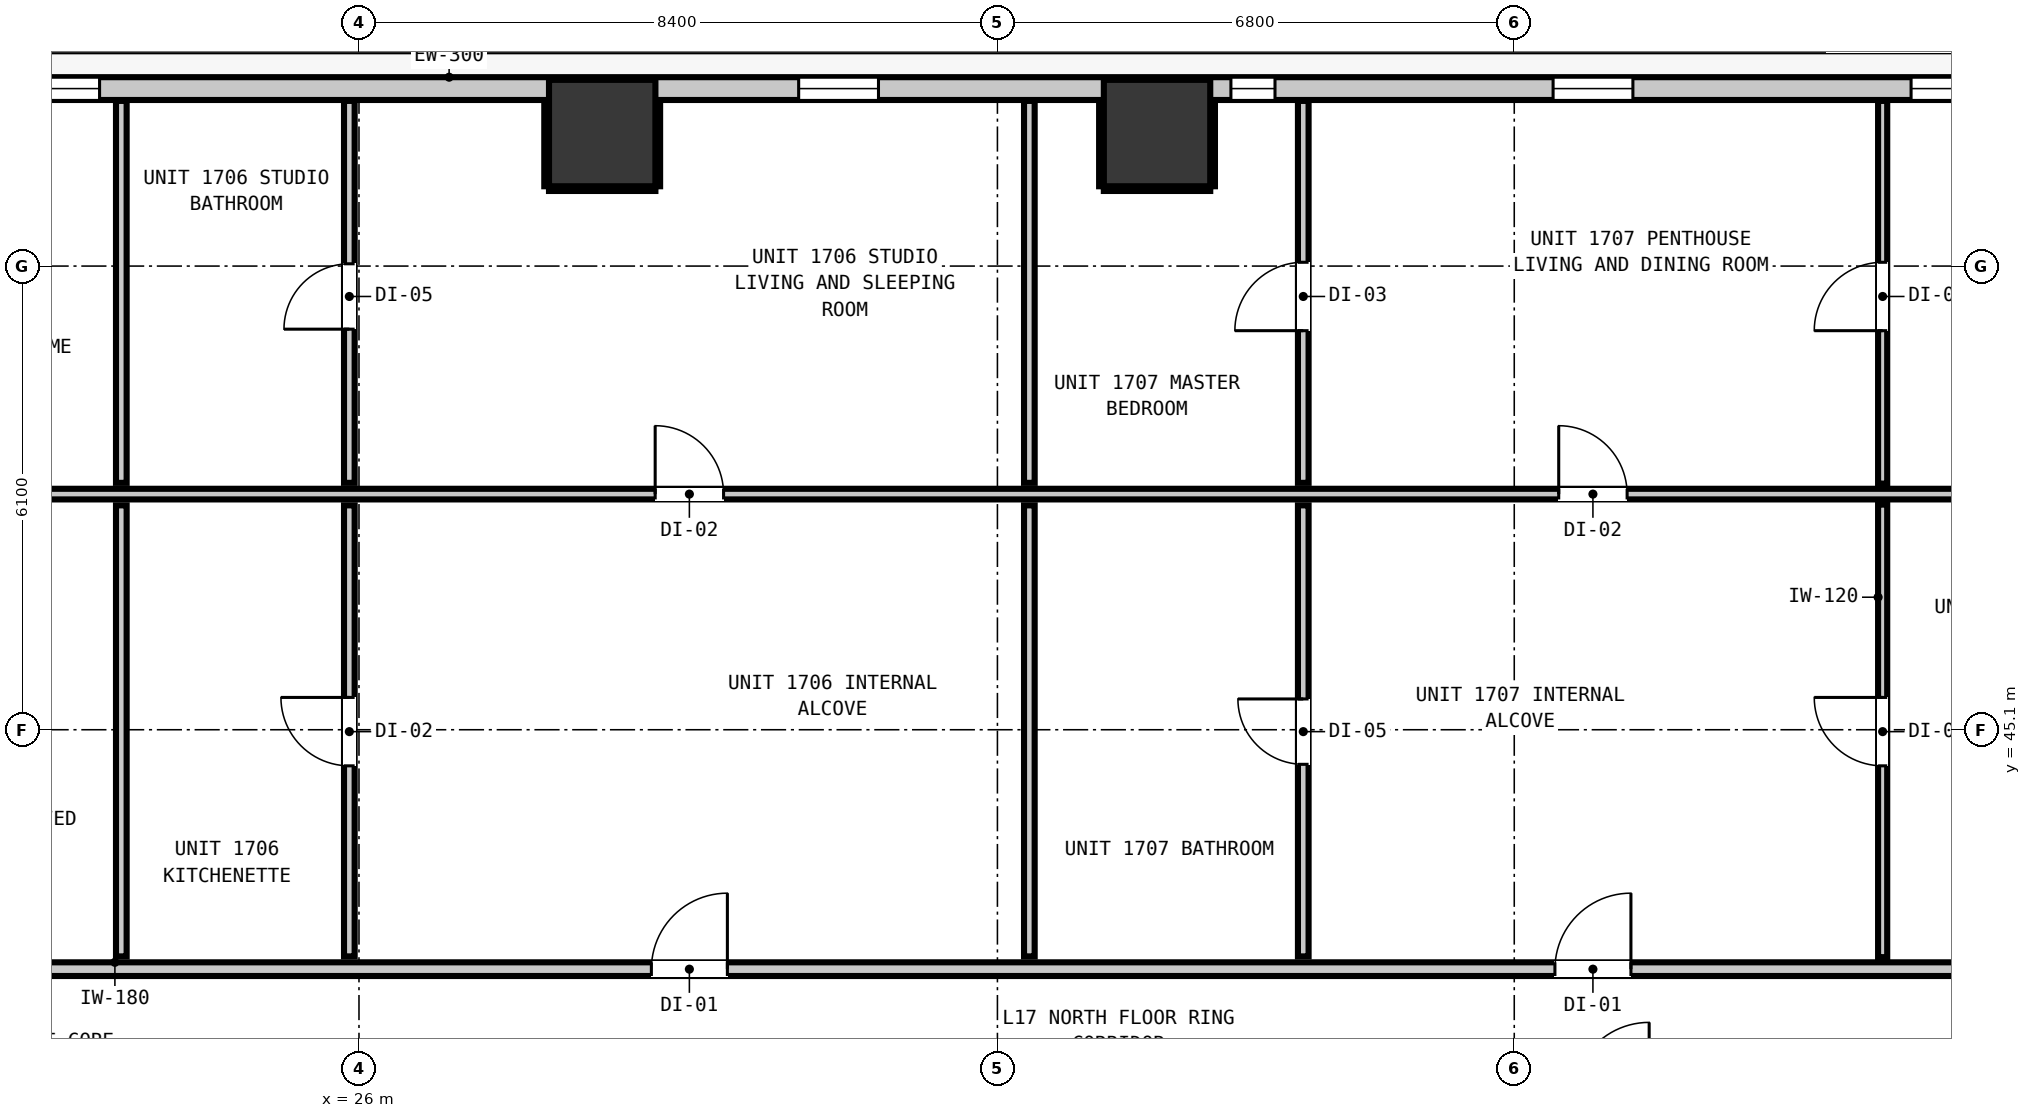
"""IFC4 building model, lengths in metres.
Left out: names, types, materials, properties, quantities, classifications, styles, units other than length and angle.
Written with IfcOpenShell. Run it as: python <this file> out.ifc"""

import sys

from ifc_helpers import new_model, si_unit, direction, frame, frame_2d, origin, origin_2d, place, context, subcontext, project, spatial, rectangle, extrude, element, fill, save


model = new_model("IFC4")
c1 = context("Model", 3, precision=1e-05, world=origin(), true_north=direction((0.0, 1.0)))
c2 = subcontext(c1, "Body", "Model", "MODEL_VIEW")
j1 = project(units=[si_unit("LENGTHUNIT", "METRE"), si_unit("PLANEANGLEUNIT", "RADIAN")], contexts=[c1])
p1 = place(None, origin())
s1 = spatial("IfcSite", under=j1, at=p1, CompositionType="ELEMENT")
p2 = place(p1, origin())
s2 = spatial("IfcBuilding", under=s1, at=p2, CompositionType="ELEMENT")
p3 = place(p2, frame((0.0, 0.0, 61.84)))
s3 = spatial("IfcBuildingStorey", under=s2, at=p3, CompositionType="ELEMENT", Elevation=61.84)
for number, where, z_axis, x_axis in (
    (1, (29.2, 52.95, -0.2), (0.0, 0.0, 1.0), (1.0, 0.0, 0.0)),
    (2, (36.5, 52.95, -0.2), (0.0, 0.0, 1.0), (1.0, 0.0, 0.0)),
):
    element("IfcColumn", number, at=place(p3, frame(where, z_axis=z_axis, x_axis=x_axis)), inside=s3, PredefinedType="COLUMN", context=c2, shape_type="SweptSolid", body=[
        extrude(rectangle(XDim=1.4, YDim=1.4, at=origin_2d()), origin(), (0.0, 0.0, 1.0), 3.52),
    ])
p4 = place(p3, frame((10.365, 53.535, 0.0), z_axis=(0.0, 0.0, 1.0), x_axis=(1.0, 0.0, 0.0)))
e3 = element("IfcWall", 3, at=p4, inside=s3, PredefinedType="STANDARD", context=c2, shape_type="SweptSolid", body=[
    extrude(rectangle(XDim=37.47, YDim=0.3, at=frame_2d((18.735, 0.0))), origin(), (0.0, 0.0, 1.0), 3.06),
])
p5 = place(p4, frame((4.403, 0.0, 0.0)))
e4 = element("IfcOpeningElement", 4, at=p5, cuts=e3, PredefinedType="OPENING", context=c2, shape_type="SweptSolid", body=[
    extrude(rectangle(XDim=1.0, YDim=2.15, at=frame_2d((0.5, 1.075))), frame((0.0, 0.16, 0.0), z_axis=(0.0, -1.0, 0.0), x_axis=(1.0, 0.0, 0.0)), (0.0, 0.0, 1.0), 0.32),
])
p6 = place(p4, frame((6.472, 0.0, 0.85)))
e5 = element("IfcOpeningElement", 5, at=p6, cuts=e3, PredefinedType="OPENING", context=c2, shape_type="SweptSolid", body=[
    extrude(rectangle(XDim=1.05, YDim=1.65, at=frame_2d((0.525, 0.825))), frame((0.0, 0.16, 0.0), z_axis=(0.0, -1.0, 0.0), x_axis=(1.0, 0.0, 0.0)), (0.0, 0.0, 1.0), 0.32),
])
p7 = place(p4, frame((0.324, 0.0, 0.85)))
e6 = element("IfcOpeningElement", 6, at=p7, cuts=e3, PredefinedType="OPENING", context=c2, shape_type="SweptSolid", body=[
    extrude(rectangle(XDim=0.58, YDim=1.5, at=frame_2d((0.29, 0.75))), frame((0.0, 0.16, 0.0), z_axis=(0.0, -1.0, 0.0), x_axis=(1.0, 0.0, 0.0)), (0.0, 0.0, 1.0), 0.32),
])
p8 = place(p4, frame((11.322, 0.0, 0.85)))
e7 = element("IfcOpeningElement", 7, at=p8, cuts=e3, PredefinedType="OPENING", context=c2, shape_type="SweptSolid", body=[
    extrude(rectangle(XDim=0.9, YDim=1.5, at=frame_2d((0.45, 0.75))), frame((0.0, 0.16, 0.0), z_axis=(0.0, -1.0, 0.0), x_axis=(1.0, 0.0, 0.0)), (0.0, 0.0, 1.0), 0.32),
])
p9 = place(p4, frame((21.42, 0.0, 0.85)))
e8 = element("IfcOpeningElement", 8, at=p9, cuts=e3, PredefinedType="OPENING", context=c2, shape_type="SweptSolid", body=[
    extrude(rectangle(XDim=1.05, YDim=1.65, at=frame_2d((0.525, 0.825))), frame((0.0, 0.16, 0.0), z_axis=(0.0, -1.0, 0.0), x_axis=(1.0, 0.0, 0.0)), (0.0, 0.0, 1.0), 0.32),
])
p10 = place(p4, frame((31.346, 0.0, 0.85)))
e9 = element("IfcOpeningElement", 9, at=p10, cuts=e3, PredefinedType="OPENING", context=c2, shape_type="SweptSolid", body=[
    extrude(rectangle(XDim=1.05, YDim=1.65, at=frame_2d((0.525, 0.825))), frame((0.0, 0.16, 0.0), z_axis=(0.0, -1.0, 0.0), x_axis=(1.0, 0.0, 0.0)), (0.0, 0.0, 1.0), 0.32),
])
p11 = place(p4, frame((27.107, 0.0, 0.85)))
e10 = element("IfcOpeningElement", 10, at=p11, cuts=e3, PredefinedType="OPENING", context=c2, shape_type="SweptSolid", body=[
    extrude(rectangle(XDim=0.58, YDim=1.5, at=frame_2d((0.29, 0.75))), frame((0.0, 0.16, 0.0), z_axis=(0.0, -1.0, 0.0), x_axis=(1.0, 0.0, 0.0)), (0.0, 0.0, 1.0), 0.32),
])
p12 = place(p4, frame((36.056, 0.0, 0.85)))
e11 = element("IfcOpeningElement", 11, at=p12, cuts=e3, PredefinedType="OPENING", context=c2, shape_type="SweptSolid", body=[
    extrude(rectangle(XDim=1.05, YDim=1.65, at=frame_2d((0.525, 0.825))), frame((0.0, 0.16, 0.0), z_axis=(0.0, -1.0, 0.0), x_axis=(1.0, 0.0, 0.0)), (0.0, 0.0, 1.0), 0.32),
])
p13 = place(p3, frame((8.027, 41.95, 0.0), z_axis=(0.0, 0.0, 1.0), x_axis=(1.0, 0.0, 0.0)))
e12 = element("IfcWall", 12, at=p13, inside=s3, PredefinedType="PARTITIONING", context=c2, shape_type="SweptSolid", body=[
    extrude(rectangle(XDim=42.146, YDim=0.18, at=frame_2d((21.073, 0.0))), origin(), (0.0, 0.0, 1.0), 3.06),
])
p14 = place(p13, frame((6.703, 0.0, 0.0)))
e13 = element("IfcOpeningElement", 13, at=p14, cuts=e12, PredefinedType="OPENING", context=c2, shape_type="SweptSolid", body=[
    extrude(rectangle(XDim=1.0, YDim=2.15, at=frame_2d((0.5, 1.075))), frame((0.0, 0.1, 0.0), z_axis=(0.0, -1.0, 0.0), x_axis=(1.0, 0.0, 0.0)), (0.0, 0.0, 1.0), 0.2),
])
p15 = place(p13, frame((21.82, 0.0, 0.0)))
e14 = element("IfcOpeningElement", 14, at=p15, cuts=e12, PredefinedType="OPENING", context=c2, shape_type="SweptSolid", body=[
    extrude(rectangle(XDim=1.0, YDim=2.15, at=frame_2d((0.5, 1.075))), frame((0.0, 0.1, 0.0), z_axis=(0.0, -1.0, 0.0), x_axis=(1.0, 0.0, 0.0)), (0.0, 0.0, 1.0), 0.2),
])
p16 = place(p13, frame((33.708, 0.0, 0.0)))
e15 = element("IfcOpeningElement", 15, at=p16, cuts=e12, PredefinedType="OPENING", context=c2, shape_type="SweptSolid", body=[
    extrude(rectangle(XDim=1.0, YDim=2.15, at=frame_2d((0.5, 1.075))), frame((0.0, 0.1, 0.0), z_axis=(0.0, -1.0, 0.0), x_axis=(1.0, 0.0, 0.0)), (0.0, 0.0, 1.0), 0.2),
])
p17 = place(p3, frame((18.857, 48.2, 0.0), z_axis=(0.0, 0.0, 1.0), x_axis=(1.0, 0.0, 0.0)))
e16 = element("IfcWall", 16, at=p17, inside=s3, PredefinedType="PARTITIONING", context=c2, shape_type="SweptSolid", body=[
    extrude(rectangle(XDim=31.316, YDim=0.14, at=frame_2d((15.658, 0.0))), origin(), (0.0, 0.0, 1.0), 3.06),
])
p18 = place(p17, frame((11.04, 0.0, 0.0)))
e17 = element("IfcOpeningElement", 17, at=p18, cuts=e16, PredefinedType="OPENING", context=c2, shape_type="SweptSolid", body=[
    extrude(rectangle(XDim=0.9, YDim=2.1, at=frame_2d((0.45, 1.05))), frame((0.0, 0.08, 0.0), z_axis=(0.0, -1.0, 0.0), x_axis=(1.0, 0.0, 0.0)), (0.0, 0.0, 1.0), 0.16),
])
p19 = place(p17, frame((22.928, 0.0, 0.0)))
e18 = element("IfcOpeningElement", 18, at=p19, cuts=e16, PredefinedType="OPENING", context=c2, shape_type="SweptSolid", body=[
    extrude(rectangle(XDim=0.9, YDim=2.1, at=frame_2d((0.45, 1.05))), frame((0.0, 0.08, 0.0), z_axis=(0.0, -1.0, 0.0), x_axis=(1.0, 0.0, 0.0)), (0.0, 0.0, 1.0), 0.16),
])
p20 = place(p3, frame((22.873, 42.118, 0.0), z_axis=(0.0, 0.0, 1.0), x_axis=(0.0, 1.0, 0.0)))
e19 = element("IfcWall", 19, at=p20, inside=s3, PredefinedType="PARTITIONING", context=c2, shape_type="SweptSolid", body=[
    extrude(rectangle(XDim=5.934, YDim=0.14, at=frame_2d((2.967, 0.0))), origin(), (0.0, 0.0, 1.0), 3.06),
])
p21 = place(p3, frame((22.873, 48.348, 0.0), z_axis=(0.0, 0.0, 1.0), x_axis=(0.0, 1.0, 0.0)))
e20 = element("IfcWall", 20, at=p21, inside=s3, PredefinedType="PARTITIONING", context=c2, shape_type="SweptSolid", body=[
    extrude(rectangle(XDim=5.025, YDim=0.14, at=frame_2d((2.513, 0.0))), origin(), (0.0, 0.0, 1.0), 3.06),
])
p22 = place(p3, frame((25.873, 42.118, 0.0), z_axis=(0.0, 0.0, 1.0), x_axis=(0.0, 1.0, 0.0)))
e21 = element("IfcWall", 21, at=p22, inside=s3, PredefinedType="PARTITIONING", context=c2, shape_type="SweptSolid", body=[
    extrude(rectangle(XDim=5.934, YDim=0.14, at=frame_2d((2.967, 0.0))), origin(), (0.0, 0.0, 1.0), 3.06),
])
p23 = place(p22, frame((2.507, 0.0, 0.0)))
e22 = element("IfcOpeningElement", 22, at=p23, cuts=e21, PredefinedType="OPENING", context=c2, shape_type="SweptSolid", body=[
    extrude(rectangle(XDim=0.9, YDim=2.1, at=frame_2d((0.45, 1.05))), frame((0.0, 0.08, 0.0), z_axis=(0.0, -1.0, 0.0), x_axis=(1.0, 0.0, 0.0)), (0.0, 0.0, 1.0), 0.16),
])
p24 = place(p3, frame((25.873, 48.348, 0.0), z_axis=(0.0, 0.0, 1.0), x_axis=(0.0, 1.0, 0.0)))
e23 = element("IfcWall", 23, at=p24, inside=s3, PredefinedType="PARTITIONING", context=c2, shape_type="SweptSolid", body=[
    extrude(rectangle(XDim=5.025, YDim=0.14, at=frame_2d((2.513, 0.0))), origin(), (0.0, 0.0, 1.0), 3.06),
])
p25 = place(p24, frame((2.022, 0.0, 0.0)))
e24 = element("IfcOpeningElement", 24, at=p25, cuts=e23, PredefinedType="OPENING", context=c2, shape_type="SweptSolid", body=[
    extrude(rectangle(XDim=0.86, YDim=2.02, at=frame_2d((0.43, 1.01))), frame((0.0, 0.08, 0.0), z_axis=(0.0, -1.0, 0.0), x_axis=(1.0, 0.0, 0.0)), (0.0, 0.0, 1.0), 0.16),
])
p26 = place(p3, frame((34.82, 42.118, 0.0), z_axis=(0.0, 0.0, 1.0), x_axis=(0.0, 1.0, 0.0)))
e25 = element("IfcWall", 25, at=p26, inside=s3, PredefinedType="PARTITIONING", context=c2, shape_type="SweptSolid", body=[
    extrude(rectangle(XDim=5.934, YDim=0.14, at=frame_2d((2.967, 0.0))), origin(), (0.0, 0.0, 1.0), 3.06),
])
p27 = place(p3, frame((34.82, 48.348, 0.0), z_axis=(0.0, 0.0, 1.0), x_axis=(0.0, 1.0, 0.0)))
e26 = element("IfcWall", 26, at=p27, inside=s3, PredefinedType="PARTITIONING", context=c2, shape_type="SweptSolid", body=[
    extrude(rectangle(XDim=5.025, YDim=0.14, at=frame_2d((2.513, 0.0))), origin(), (0.0, 0.0, 1.0), 3.06),
])
p28 = place(p3, frame((38.424, 42.118, 0.0), z_axis=(0.0, 0.0, 1.0), x_axis=(0.0, 1.0, 0.0)))
e27 = element("IfcWall", 27, at=p28, inside=s3, PredefinedType="PARTITIONING", context=c2, shape_type="SweptSolid", body=[
    extrude(rectangle(XDim=5.934, YDim=0.14, at=frame_2d((2.967, 0.0))), origin(), (0.0, 0.0, 1.0), 3.06),
])
p29 = place(p28, frame((2.527, 0.0, 0.0)))
e28 = element("IfcOpeningElement", 28, at=p29, cuts=e27, PredefinedType="OPENING", context=c2, shape_type="SweptSolid", body=[
    extrude(rectangle(XDim=0.86, YDim=2.02, at=frame_2d((0.43, 1.01))), frame((0.0, 0.08, 0.0), z_axis=(0.0, -1.0, 0.0), x_axis=(1.0, 0.0, 0.0)), (0.0, 0.0, 1.0), 0.16),
])
p30 = place(p3, frame((38.424, 48.348, 0.0), z_axis=(0.0, 0.0, 1.0), x_axis=(0.0, 1.0, 0.0)))
e29 = element("IfcWall", 29, at=p30, inside=s3, PredefinedType="PARTITIONING", context=c2, shape_type="SweptSolid", body=[
    extrude(rectangle(XDim=5.025, YDim=0.14, at=frame_2d((2.513, 0.0))), origin(), (0.0, 0.0, 1.0), 3.06),
])
p31 = place(p30, frame((2.002, 0.0, 0.0)))
e30 = element("IfcOpeningElement", 30, at=p31, cuts=e29, PredefinedType="OPENING", context=c2, shape_type="SweptSolid", body=[
    extrude(rectangle(XDim=0.9, YDim=2.1, at=frame_2d((0.45, 1.05))), frame((0.0, 0.08, 0.0), z_axis=(0.0, -1.0, 0.0), x_axis=(1.0, 0.0, 0.0)), (0.0, 0.0, 1.0), 0.16),
])
p32 = place(p3, frame((46.047, 42.108, 0.0), z_axis=(0.0, 0.0, 1.0), x_axis=(0.0, 1.0, 0.0)))
e31 = element("IfcWall", 31, at=p32, inside=s3, PredefinedType="PARTITIONING", context=c2, shape_type="SweptSolid", body=[
    extrude(rectangle(XDim=5.954, YDim=0.12, at=frame_2d((2.977, 0.0))), origin(), (0.0, 0.0, 1.0), 3.06),
])
p33 = place(p32, frame((2.517, 0.0, 0.0)))
e32 = element("IfcOpeningElement", 32, at=p33, cuts=e31, PredefinedType="OPENING", context=c2, shape_type="SweptSolid", body=[
    extrude(rectangle(XDim=0.9, YDim=2.1, at=frame_2d((0.45, 1.05))), frame((0.0, 0.07, 0.0), z_axis=(0.0, -1.0, 0.0), x_axis=(1.0, 0.0, 0.0)), (0.0, 0.0, 1.0), 0.14),
])
p34 = place(p3, frame((46.047, 48.338, 0.0), z_axis=(0.0, 0.0, 1.0), x_axis=(0.0, 1.0, 0.0)))
e33 = element("IfcWall", 33, at=p34, inside=s3, PredefinedType="PARTITIONING", context=c2, shape_type="SweptSolid", body=[
    extrude(rectangle(XDim=5.035, YDim=0.12, at=frame_2d((2.518, 0.0))), origin(), (0.0, 0.0, 1.0), 3.06),
])
p35 = place(p34, frame((2.012, 0.0, 0.0)))
e34 = element("IfcOpeningElement", 34, at=p35, cuts=e33, PredefinedType="OPENING", context=c2, shape_type="SweptSolid", body=[
    extrude(rectangle(XDim=0.9, YDim=2.1, at=frame_2d((0.45, 1.05))), frame((0.0, 0.07, 0.0), z_axis=(0.0, -1.0, 0.0), x_axis=(1.0, 0.0, 0.0)), (0.0, 0.0, 1.0), 0.14),
])
p36 = place(p3, frame((28.5, 52.218, 0.0), z_axis=(0.0, 0.0, 1.0), x_axis=(1.0, 0.0, 0.0)))
e35 = element("IfcWall", 35, at=p36, inside=s3, PredefinedType="PARTITIONING", context=c2, shape_type="SweptSolid", body=[
    extrude(rectangle(XDim=1.4, YDim=0.06, at=frame_2d((0.7, 0.0))), origin(), (0.0, 0.0, 1.0), 1.45),
])
for number, where, z_axis, x_axis in (
    (36, (28.468, 52.25, 0.0), (0.0, 0.0, 1.0), (0.0, 1.0, 0.0)),
    (37, (29.932, 52.25, 0.0), (0.0, 0.0, 1.0), (0.0, 1.0, 0.0)),
):
    element("IfcWall", number, at=place(p3, frame(where, z_axis=z_axis, x_axis=x_axis)), inside=s3, PredefinedType="PARTITIONING", context=c2, shape_type="SweptSolid", body=[
        extrude(rectangle(XDim=1.12, YDim=0.06, at=frame_2d((0.56, 0.0))), origin(), (0.0, 0.0, 1.0), 1.45),
    ])
p37 = place(p3, frame((35.8, 52.218, 0.0), z_axis=(0.0, 0.0, 1.0), x_axis=(1.0, 0.0, 0.0)))
e38 = element("IfcWall", 38, at=p37, inside=s3, PredefinedType="PARTITIONING", context=c2, shape_type="SweptSolid", body=[
    extrude(rectangle(XDim=1.4, YDim=0.06, at=frame_2d((0.7, 0.0))), origin(), (0.0, 0.0, 1.0), 1.45),
])
for number, where, z_axis, x_axis in (
    (39, (35.768, 52.25, 0.0), (0.0, 0.0, 1.0), (0.0, 1.0, 0.0)),
    (40, (37.232, 52.25, 0.0), (0.0, 0.0, 1.0), (0.0, 1.0, 0.0)),
):
    element("IfcWall", number, at=place(p3, frame(where, z_axis=z_axis, x_axis=x_axis)), inside=s3, PredefinedType="PARTITIONING", context=c2, shape_type="SweptSolid", body=[
        extrude(rectangle(XDim=1.12, YDim=0.06, at=frame_2d((0.56, 0.0))), origin(), (0.0, 0.0, 1.0), 1.45),
    ])
p38 = place(p8, origin())
e41 = element("IfcWindow", 41, at=p38, inside=s3, PartitioningType="SINGLE_PANEL", PredefinedType="WINDOW", context=c2, shape_type="SweptSolid", body=[
    extrude(rectangle(XDim=0.9, YDim=1.5, at=frame_2d((0.45, 0.75))), frame((0.0, 0.03, 0.0), z_axis=(0.0, -1.0, 0.0), x_axis=(1.0, 0.0, 0.0)), (0.0, 0.0, 1.0), 0.06),
])
fill(e7, e41)
p39 = place(p9, origin())
e42 = element("IfcWindow", 42, at=p39, inside=s3, PartitioningType="SINGLE_PANEL", PredefinedType="WINDOW", context=c2, shape_type="SweptSolid", body=[
    extrude(rectangle(XDim=1.05, YDim=1.65, at=frame_2d((0.525, 0.825))), frame((0.0, 0.03, 0.0), z_axis=(0.0, -1.0, 0.0), x_axis=(1.0, 0.0, 0.0)), (0.0, 0.0, 1.0), 0.06),
])
fill(e8, e42)
p40 = place(p10, origin())
e43 = element("IfcWindow", 43, at=p40, inside=s3, PartitioningType="SINGLE_PANEL", PredefinedType="WINDOW", context=c2, shape_type="SweptSolid", body=[
    extrude(rectangle(XDim=1.05, YDim=1.65, at=frame_2d((0.525, 0.825))), frame((0.0, 0.03, 0.0), z_axis=(0.0, -1.0, 0.0), x_axis=(1.0, 0.0, 0.0)), (0.0, 0.0, 1.0), 0.06),
])
fill(e9, e43)
p41 = place(p11, origin())
e44 = element("IfcWindow", 44, at=p41, inside=s3, PartitioningType="SINGLE_PANEL", PredefinedType="WINDOW", context=c2, shape_type="SweptSolid", body=[
    extrude(rectangle(XDim=0.58, YDim=1.5, at=frame_2d((0.29, 0.75))), frame((0.0, 0.03, 0.0), z_axis=(0.0, -1.0, 0.0), x_axis=(1.0, 0.0, 0.0)), (0.0, 0.0, 1.0), 0.06),
])
fill(e10, e44)
p42 = place(p12, origin())
e45 = element("IfcWindow", 45, at=p42, inside=s3, PartitioningType="SINGLE_PANEL", PredefinedType="WINDOW", context=c2, shape_type="SweptSolid", body=[
    extrude(rectangle(XDim=1.05, YDim=1.65, at=frame_2d((0.525, 0.825))), frame((0.0, 0.03, 0.0), z_axis=(0.0, -1.0, 0.0), x_axis=(1.0, 0.0, 0.0)), (0.0, 0.0, 1.0), 0.06),
])
fill(e11, e45)
p43 = place(p15, origin())
e46 = element("IfcDoor", 46, at=p43, inside=s3, OperationType="SINGLE_SWING_RIGHT", PredefinedType="DOOR", context=c2, shape_type="SweptSolid", body=[
    extrude(rectangle(XDim=1.0, YDim=2.15, at=frame_2d((0.5, 1.075))), frame((0.0, 0.025, 0.0), z_axis=(0.0, -1.0, 0.0), x_axis=(1.0, 0.0, 0.0)), (0.0, 0.0, 1.0), 0.05),
])
fill(e14, e46)
p44 = place(p18, origin())
e47 = element("IfcDoor", 47, at=p44, inside=s3, OperationType="SINGLE_SWING_LEFT", PredefinedType="DOOR", context=c2, shape_type="SweptSolid", body=[
    extrude(rectangle(XDim=0.9, YDim=2.1, at=frame_2d((0.45, 1.05))), frame((0.0, 0.025, 0.0), z_axis=(0.0, -1.0, 0.0), x_axis=(1.0, 0.0, 0.0)), (0.0, 0.0, 1.0), 0.05),
])
fill(e17, e47)
p45 = place(p23, origin())
e48 = element("IfcDoor", 48, at=p45, inside=s3, OperationType="SINGLE_SWING_RIGHT", PredefinedType="DOOR", context=c2, shape_type="SweptSolid", body=[
    extrude(rectangle(XDim=0.9, YDim=2.1, at=frame_2d((0.45, 1.05))), frame((0.0, 0.025, 0.0), z_axis=(0.0, -1.0, 0.0), x_axis=(1.0, 0.0, 0.0)), (0.0, 0.0, 1.0), 0.05),
])
fill(e22, e48)
p46 = place(p25, origin())
e49 = element("IfcDoor", 49, at=p46, inside=s3, OperationType="SINGLE_SWING_LEFT", PredefinedType="DOOR", context=c2, shape_type="SweptSolid", body=[
    extrude(rectangle(XDim=0.86, YDim=2.02, at=frame_2d((0.43, 1.01))), frame((0.0, 0.025, 0.0), z_axis=(0.0, -1.0, 0.0), x_axis=(1.0, 0.0, 0.0)), (0.0, 0.0, 1.0), 0.05),
])
fill(e24, e49)
p47 = place(p16, origin())
e50 = element("IfcDoor", 50, at=p47, inside=s3, OperationType="SINGLE_SWING_RIGHT", PredefinedType="DOOR", context=c2, shape_type="SweptSolid", body=[
    extrude(rectangle(XDim=1.0, YDim=2.15, at=frame_2d((0.5, 1.075))), frame((0.0, 0.025, 0.0), z_axis=(0.0, -1.0, 0.0), x_axis=(1.0, 0.0, 0.0)), (0.0, 0.0, 1.0), 0.05),
])
fill(e15, e50)
p48 = place(p19, origin())
e51 = element("IfcDoor", 51, at=p48, inside=s3, OperationType="SINGLE_SWING_LEFT", PredefinedType="DOOR", context=c2, shape_type="SweptSolid", body=[
    extrude(rectangle(XDim=0.9, YDim=2.1, at=frame_2d((0.45, 1.05))), frame((0.0, 0.025, 0.0), z_axis=(0.0, -1.0, 0.0), x_axis=(1.0, 0.0, 0.0)), (0.0, 0.0, 1.0), 0.05),
])
fill(e18, e51)
p49 = place(p29, origin())
e52 = element("IfcDoor", 52, at=p49, inside=s3, OperationType="SINGLE_SWING_RIGHT", PredefinedType="DOOR", context=c2, shape_type="SweptSolid", body=[
    extrude(rectangle(XDim=0.86, YDim=2.02, at=frame_2d((0.43, 1.01))), frame((0.0, 0.025, 0.0), z_axis=(0.0, -1.0, 0.0), x_axis=(1.0, 0.0, 0.0)), (0.0, 0.0, 1.0), 0.05),
])
fill(e28, e52)
p50 = place(p31, origin())
e53 = element("IfcDoor", 53, at=p50, inside=s3, OperationType="SINGLE_SWING_LEFT", PredefinedType="DOOR", context=c2, shape_type="SweptSolid", body=[
    extrude(rectangle(XDim=0.9, YDim=2.1, at=frame_2d((0.45, 1.05))), frame((0.0, 0.025, 0.0), z_axis=(0.0, -1.0, 0.0), x_axis=(1.0, 0.0, 0.0)), (0.0, 0.0, 1.0), 0.05),
])
fill(e30, e53)
p51 = place(p33, origin())
e54 = element("IfcDoor", 54, at=p51, inside=s3, OperationType="SINGLE_SWING_RIGHT", PredefinedType="DOOR", context=c2, shape_type="SweptSolid", body=[
    extrude(rectangle(XDim=0.9, YDim=2.1, at=frame_2d((0.45, 1.05))), frame((0.0, 0.025, 0.0), z_axis=(0.0, -1.0, 0.0), x_axis=(1.0, 0.0, 0.0)), (0.0, 0.0, 1.0), 0.05),
])
fill(e32, e54)
p52 = place(p35, origin())
e55 = element("IfcDoor", 55, at=p52, inside=s3, OperationType="SINGLE_SWING_LEFT", PredefinedType="DOOR", context=c2, shape_type="SweptSolid", body=[
    extrude(rectangle(XDim=0.9, YDim=2.1, at=frame_2d((0.45, 1.05))), frame((0.0, 0.025, 0.0), z_axis=(0.0, -1.0, 0.0), x_axis=(1.0, 0.0, 0.0)), (0.0, 0.0, 1.0), 0.05),
])
fill(e34, e55)
save(model, sys.argv[1])
